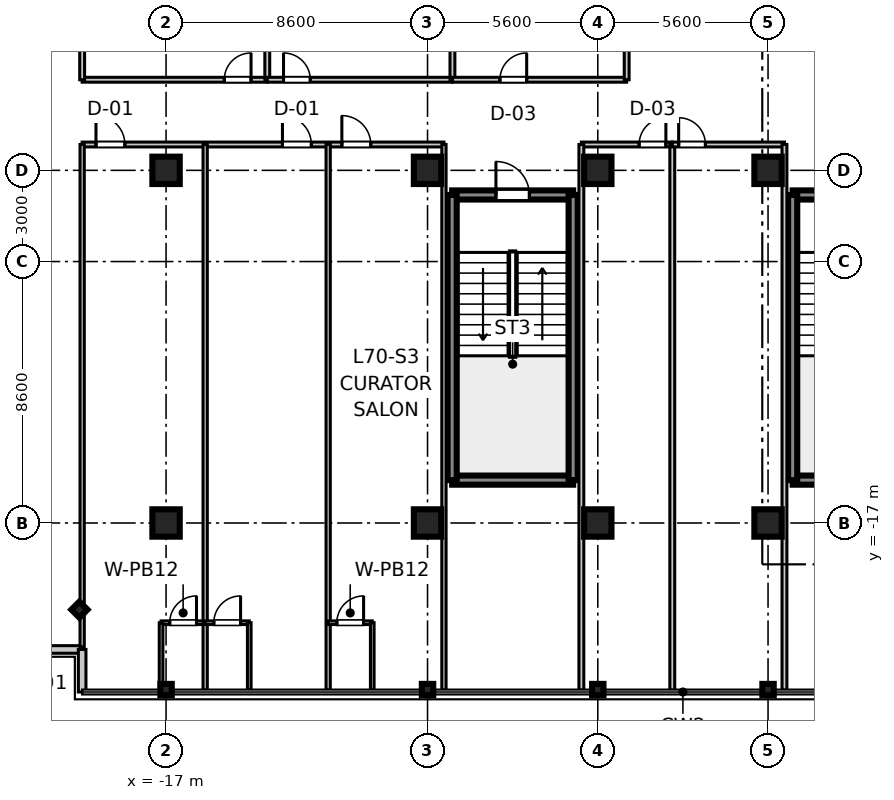
"""IFC4 building model, lengths in metres.
Left out: names, types, materials, properties, quantities, classifications, styles, units other than length and angle.
Written with IfcOpenShell. Run it as: python <this file> out.ifc"""

import sys

from ifc_helpers import new_model, si_unit, direction, frame, frame_2d, origin, origin_2d, place, context, subcontext, project, spatial, rectangle, i_section, extrude, source, transform, mapped, element, fill, save


model = new_model("IFC4")
c1 = context("Model", 3, precision=1e-05, world=origin(), true_north=direction((0.0, 1.0)))
c2 = subcontext(c1, "Body", "Model", "MODEL_VIEW")
j1 = project(units=[si_unit("LENGTHUNIT", "METRE"), si_unit("PLANEANGLEUNIT", "RADIAN")], contexts=[c1])
p1 = place(None, origin())
s1 = spatial("IfcSite", under=j1, at=p1, CompositionType="ELEMENT")
p2 = place(p1, origin())
s2 = spatial("IfcBuilding", under=s1, at=p2, CompositionType="ELEMENT")
p3 = place(p2, frame((0.0, 0.0, 273.8)))
s3 = spatial("IfcBuildingStorey", under=s2, at=p3, CompositionType="ELEMENT", Elevation=273.8)
m1 = source(origin(), c2, "Body", "SweptSolid", [
    extrude(rectangle(XDim=0.9, YDim=0.9, at=origin_2d()), origin(), (0.0, 0.0, 1.0), 3.705),
])
for number, where, z_axis, x_axis in (
    (1, (-17.0, -17.0, 0.0), (0.0, 0.0, 1.0), (1.0, 0.0, 0.0)),
    (2, (-17.0, -5.4, 0.0), (0.0, 0.0, 1.0), (1.0, 0.0, 0.0)),
    (3, (-8.4, -17.0, 0.0), (0.0, 0.0, 1.0), (1.0, 0.0, 0.0)),
    (4, (-8.4, -5.4, 0.0), (0.0, 0.0, 1.0), (1.0, 0.0, 0.0)),
    (5, (-2.8, -17.0, 0.0), (0.0, 0.0, 1.0), (1.0, 0.0, 0.0)),
    (6, (-2.8, -5.4, 0.0), (0.0, 0.0, 1.0), (1.0, 0.0, 0.0)),
    (7, (2.8, -17.0, 0.0), (0.0, 0.0, 1.0), (1.0, 0.0, 0.0)),
    (8, (2.8, -5.4, 0.0), (0.0, 0.0, 1.0), (1.0, 0.0, 0.0)),
):
    element("IfcColumn", number, at=place(p3, frame(where, z_axis=z_axis, x_axis=x_axis)), inside=s3, PredefinedType="COLUMN", context=c2, shape_type="MappedRepresentation", body=[
        mapped(m1, transform((0.0, 0.0, 0.0), scale=1.0)),
    ])
m2 = source(origin(), c2, "Body", "SweptSolid", [
    extrude(i_section(OverallWidth=0.374, OverallDepth=0.374, WebThickness=0.014, FlangeThickness=0.023, at=origin_2d()), origin(), (0.0, 0.0, 1.0), 3.705),
])
for number, where, z_axis, x_axis in (
    (9, (-17.0, -22.48, 0.0), (0.0, 0.0, 1.0), (0.0, 1.0, 0.0)),
    (10, (-8.4, -22.48, 0.0), (0.0, 0.0, 1.0), (0.0, 1.0, 0.0)),
    (11, (-2.8, -22.48, 0.0), (0.0, 0.0, 1.0), (0.0, 1.0, 0.0)),
    (12, (2.8, -22.48, 0.0), (0.0, 0.0, 1.0), (0.0, 1.0, 0.0)),
    (13, (-19.85, -19.85, 0.0), (0.0, 0.0, 1.0), (0.707, 0.707, 0.0)),
):
    element("IfcColumn", number, at=place(p3, frame(where, z_axis=z_axis, x_axis=x_axis)), inside=s3, PredefinedType="COLUMN", context=c2, shape_type="MappedRepresentation", body=[
        mapped(m2, transform((0.0, 0.0, 0.0), scale=1.0)),
    ])
m3 = source(origin(), c2, "Body", "SweptSolid", [
    extrude(rectangle(XDim=3.98, YDim=0.3, at=frame_2d((1.99, 0.0))), origin(), (0.0, 0.0, 1.0), 3.45),
])
for number, where, z_axis, x_axis in (
    (14, (3.61, -15.59, 0.0), (0.0, 0.0, 1.0), (1.0, 0.0, 0.0)),
    (15, (3.61, -6.21, 0.0), (0.0, 0.0, 1.0), (1.0, 0.0, 0.0)),
):
    element("IfcWall", number, at=place(p3, frame(where, z_axis=z_axis, x_axis=x_axis)), inside=s3, PredefinedType="SHEAR", context=c2, shape_type="MappedRepresentation", body=[
        mapped(m3, transform((0.0, 0.0, 0.0), scale=1.0)),
    ])
m4 = source(origin(), c2, "Body", "SweptSolid", [
    extrude(rectangle(XDim=9.38, YDim=0.3, at=frame_2d((4.69, 0.0))), origin(), (0.0, 0.0, 1.0), 3.45),
])
p4 = place(p3, frame((3.61, -15.59, 0.0), z_axis=(0.0, 0.0, 1.0), x_axis=(0.0, 1.0, 0.0)))
e16 = element("IfcWall", 16, at=p4, inside=s3, PredefinedType="SHEAR", context=c2, shape_type="MappedRepresentation", body=[
    mapped(m4, transform((0.0, 0.0, 0.0), scale=1.0)),
])
p5 = place(p3, frame((-7.59, -15.59, 0.0), z_axis=(0.0, 0.0, 1.0), x_axis=(1.0, 0.0, 0.0)))
e17 = element("IfcWall", 17, at=p5, inside=s3, PredefinedType="SHEAR", context=c2, shape_type="MappedRepresentation", body=[
    mapped(m3, transform((0.0, 0.0, 0.0), scale=1.0)),
])
p6 = place(p3, frame((-7.59, -6.21, 0.0), z_axis=(0.0, 0.0, 1.0), x_axis=(1.0, 0.0, 0.0)))
e18 = element("IfcWall", 18, at=p6, inside=s3, PredefinedType="SHEAR", context=c2, shape_type="MappedRepresentation", body=[
    mapped(m3, transform((0.0, 0.0, 0.0), scale=1.0)),
])
p7 = place(p6, frame((1.44, 0.0, 0.0)))
e19 = element("IfcOpeningElement", 19, at=p7, cuts=e18, PredefinedType="OPENING", context=c2, shape_type="SweptSolid", body=[
    extrude(rectangle(XDim=1.1, YDim=2.15, at=frame_2d((0.55, 1.075))), frame((0.0, 0.16, 0.0), z_axis=(0.0, -1.0, 0.0), x_axis=(1.0, 0.0, 0.0)), (0.0, 0.0, 1.0), 0.32),
])
for number, where, z_axis, x_axis in (
    (20, (-7.59, -15.59, 0.0), (0.0, 0.0, 1.0), (0.0, 1.0, 0.0)),
    (21, (-3.61, -15.59, 0.0), (0.0, 0.0, 1.0), (0.0, 1.0, 0.0)),
):
    element("IfcWall", number, at=place(p3, frame(where, z_axis=z_axis, x_axis=x_axis)), inside=s3, PredefinedType="SHEAR", context=c2, shape_type="MappedRepresentation", body=[
        mapped(m4, transform((0.0, 0.0, 0.0), scale=1.0)),
    ])
m5 = source(origin(), c2, "Body", "SweptSolid", [
    extrude(rectangle(XDim=1.4, YDim=0.25, at=frame_2d((0.7, 0.0))), origin(), (0.0, 0.0, 1.0), 3.45),
])
p8 = place(p3, frame((-21.16, -21.16, 0.0), z_axis=(0.0, 0.0, 1.0), x_axis=(1.0, 0.0, 0.0)))
e22 = element("IfcWall", 22, at=p8, inside=s3, PredefinedType="STANDARD", context=c2, shape_type="MappedRepresentation", body=[
    mapped(m5, transform((0.0, 0.0, 0.0), scale=1.0)),
])
m6 = source(origin(), c2, "Body", "SweptSolid", [
    extrude(rectangle(XDim=1.4, YDim=0.25, at=frame_2d((0.7, 0.0))), origin(), (0.0, 0.0, 1.0), 3.45),
])
p9 = place(p3, frame((-19.76, -22.56, 0.0), z_axis=(0.0, 0.0, 1.0), x_axis=(0.0, 1.0, 0.0)))
e23 = element("IfcWall", 23, at=p9, inside=s3, PredefinedType="STANDARD", context=c2, shape_type="MappedRepresentation", body=[
    mapped(m6, transform((0.0, 0.0, 0.0), scale=1.0)),
])
m7 = source(origin(), c2, "Body", "SweptSolid", [
    extrude(rectangle(XDim=11.9, YDim=0.16, at=frame_2d((5.95, 0.0))), origin(), (0.0, 0.0, 1.0), 2.79),
])
p10 = place(p3, frame((-19.76, -4.55, 0.0), z_axis=(0.0, 0.0, 1.0), x_axis=(1.0, 0.0, 0.0)))
e24 = element("IfcWall", 24, at=p10, inside=s3, PredefinedType="PARTITIONING", context=c2, shape_type="MappedRepresentation", body=[
    mapped(m7, transform((0.0, 0.0, 0.0), scale=1.0)),
])
p11 = place(p10, frame((0.455, 0.0, 0.0)))
e25 = element("IfcOpeningElement", 25, at=p11, cuts=e24, PredefinedType="OPENING", context=c2, shape_type="SweptSolid", body=[
    extrude(rectangle(XDim=0.95, YDim=2.1, at=frame_2d((0.475, 1.05))), frame((0.0, 0.09, 0.0), z_axis=(0.0, -1.0, 0.0), x_axis=(1.0, 0.0, 0.0)), (0.0, 0.0, 1.0), 0.18),
])
p12 = place(p10, frame((6.588, 0.0, 0.0)))
e26 = element("IfcOpeningElement", 26, at=p12, cuts=e24, PredefinedType="OPENING", context=c2, shape_type="SweptSolid", body=[
    extrude(rectangle(XDim=0.95, YDim=2.1, at=frame_2d((0.475, 1.05))), frame((0.0, 0.09, 0.0), z_axis=(0.0, -1.0, 0.0), x_axis=(1.0, 0.0, 0.0)), (0.0, 0.0, 1.0), 0.18),
])
p13 = place(p10, frame((8.542, 0.0, 0.0)))
e27 = element("IfcOpeningElement", 27, at=p13, cuts=e24, PredefinedType="OPENING", context=c2, shape_type="SweptSolid", body=[
    extrude(rectangle(XDim=0.95, YDim=2.1, at=frame_2d((0.475, 1.05))), frame((0.0, 0.09, 0.0), z_axis=(0.0, -1.0, 0.0), x_axis=(1.0, 0.0, 0.0)), (0.0, 0.0, 1.0), 0.18),
])
m8 = source(origin(), c2, "Body", "SweptSolid", [
    extrude(rectangle(XDim=16.53, YDim=0.14, at=frame_2d((8.265, 0.0))), origin(), (0.0, 0.0, 1.0), 2.79),
])
p14 = place(p3, frame((-19.76, -21.08, 0.0), z_axis=(0.0, 0.0, 1.0), x_axis=(0.0, 1.0, 0.0)))
e28 = element("IfcWall", 28, at=p14, inside=s3, PredefinedType="PARTITIONING", context=c2, shape_type="MappedRepresentation", body=[
    mapped(m8, transform((0.0, 0.0, 0.0), scale=1.0)),
])
m9 = source(origin(), c2, "Body", "SweptSolid", [
    extrude(rectangle(XDim=17.95, YDim=0.14, at=frame_2d((8.975, 0.0))), origin(), (0.0, 0.0, 1.0), 2.79),
])
p15 = place(p3, frame((-7.86, -22.5, 0.0), z_axis=(0.0, 0.0, 1.0), x_axis=(0.0, 1.0, 0.0)))
e29 = element("IfcWall", 29, at=p15, inside=s3, PredefinedType="PARTITIONING", context=c2, shape_type="MappedRepresentation", body=[
    mapped(m9, transform((0.0, 0.0, 0.0), scale=1.0)),
])
m10 = source(origin(), c2, "Body", "SweptSolid", [
    extrude(rectangle(XDim=1.45, YDim=0.12, at=frame_2d((0.725, 0.0))), origin(), (0.0, 0.0, 1.0), 2.79),
])
p16 = place(p3, frame((-17.164, -20.28, 0.0), z_axis=(0.0, 0.0, 1.0), x_axis=(1.0, 0.0, 0.0)))
e30 = element("IfcWall", 30, at=p16, inside=s3, PredefinedType="PARTITIONING", context=c2, shape_type="MappedRepresentation", body=[
    mapped(m10, transform((0.0, 0.0, 0.0), scale=1.0)),
])
p17 = place(p16, frame((0.285, 0.0, 0.0)))
e31 = element("IfcOpeningElement", 31, at=p17, cuts=e30, PredefinedType="OPENING", context=c2, shape_type="SweptSolid", body=[
    extrude(rectangle(XDim=0.88, YDim=2.1, at=frame_2d((0.44, 1.05))), frame((0.0, 0.07, 0.0), z_axis=(0.0, -1.0, 0.0), x_axis=(1.0, 0.0, 0.0)), (0.0, 0.0, 1.0), 0.14),
])
m11 = source(origin(), c2, "Body", "SweptSolid", [
    extrude(rectangle(XDim=2.22, YDim=0.12, at=frame_2d((1.11, 0.0))), origin(), (0.0, 0.0, 1.0), 2.79),
])
p18 = place(p3, frame((-17.164, -22.5, 0.0), z_axis=(0.0, 0.0, 1.0), x_axis=(0.0, 1.0, 0.0)))
e32 = element("IfcWall", 32, at=p18, inside=s3, PredefinedType="PARTITIONING", context=c2, shape_type="MappedRepresentation", body=[
    mapped(m11, transform((0.0, 0.0, 0.0), scale=1.0)),
])
p19 = place(p3, frame((-15.714, -22.5, 0.0), z_axis=(0.0, 0.0, 1.0), x_axis=(0.0, 1.0, 0.0)))
e33 = element("IfcWall", 33, at=p19, inside=s3, PredefinedType="PARTITIONING", context=c2, shape_type="MappedRepresentation", body=[
    mapped(m9, transform((0.0, 0.0, 0.0), scale=1.0)),
])
m12 = source(origin(), c2, "Body", "SweptSolid", [
    extrude(rectangle(XDim=1.45, YDim=0.12, at=frame_2d((0.725, 0.0))), origin(), (0.0, 0.0, 1.0), 2.79),
])
p20 = place(p3, frame((-15.714, -20.28, 0.0), z_axis=(0.0, 0.0, 1.0), x_axis=(1.0, 0.0, 0.0)))
e34 = element("IfcWall", 34, at=p20, inside=s3, PredefinedType="PARTITIONING", context=c2, shape_type="MappedRepresentation", body=[
    mapped(m12, transform((0.0, 0.0, 0.0), scale=1.0)),
])
p21 = place(p20, frame((0.285, 0.0, 0.0)))
e35 = element("IfcOpeningElement", 35, at=p21, cuts=e34, PredefinedType="OPENING", context=c2, shape_type="SweptSolid", body=[
    extrude(rectangle(XDim=0.88, YDim=2.1, at=frame_2d((0.44, 1.05))), frame((0.0, 0.07, 0.0), z_axis=(0.0, -1.0, 0.0), x_axis=(1.0, 0.0, 0.0)), (0.0, 0.0, 1.0), 0.14),
])
p22 = place(p3, frame((-14.264, -22.5, 0.0), z_axis=(0.0, 0.0, 1.0), x_axis=(0.0, 1.0, 0.0)))
e36 = element("IfcWall", 36, at=p22, inside=s3, PredefinedType="PARTITIONING", context=c2, shape_type="MappedRepresentation", body=[
    mapped(m11, transform((0.0, 0.0, 0.0), scale=1.0)),
])
p23 = place(p3, frame((-11.668, -22.5, 0.0), z_axis=(0.0, 0.0, 1.0), x_axis=(0.0, 1.0, 0.0)))
e37 = element("IfcWall", 37, at=p23, inside=s3, PredefinedType="PARTITIONING", context=c2, shape_type="MappedRepresentation", body=[
    mapped(m9, transform((0.0, 0.0, 0.0), scale=1.0)),
])
p24 = place(p3, frame((-11.668, -20.28, 0.0), z_axis=(0.0, 0.0, 1.0), x_axis=(1.0, 0.0, 0.0)))
e38 = element("IfcWall", 38, at=p24, inside=s3, PredefinedType="PARTITIONING", context=c2, shape_type="MappedRepresentation", body=[
    mapped(m10, transform((0.0, 0.0, 0.0), scale=1.0)),
])
p25 = place(p24, frame((0.285, 0.0, 0.0)))
e39 = element("IfcOpeningElement", 39, at=p25, cuts=e38, PredefinedType="OPENING", context=c2, shape_type="SweptSolid", body=[
    extrude(rectangle(XDim=0.88, YDim=2.1, at=frame_2d((0.44, 1.05))), frame((0.0, 0.07, 0.0), z_axis=(0.0, -1.0, 0.0), x_axis=(1.0, 0.0, 0.0)), (0.0, 0.0, 1.0), 0.14),
])
p26 = place(p3, frame((-10.218, -22.5, 0.0), z_axis=(0.0, 0.0, 1.0), x_axis=(0.0, 1.0, 0.0)))
e40 = element("IfcWall", 40, at=p26, inside=s3, PredefinedType="PARTITIONING", context=c2, shape_type="MappedRepresentation", body=[
    mapped(m11, transform((0.0, 0.0, 0.0), scale=1.0)),
])
m13 = source(origin(), c2, "Body", "SweptSolid", [
    extrude(rectangle(XDim=2.99, YDim=0.16, at=frame_2d((1.495, 0.0))), origin(), (0.0, 0.0, 1.0), 2.79),
])
p27 = place(p3, frame((-3.34, -4.55, 0.0), z_axis=(0.0, 0.0, 1.0), x_axis=(1.0, 0.0, 0.0)))
e41 = element("IfcWall", 41, at=p27, inside=s3, PredefinedType="PARTITIONING", context=c2, shape_type="MappedRepresentation", body=[
    mapped(m13, transform((0.0, 0.0, 0.0), scale=1.0)),
])
p28 = place(p27, frame((1.9, 0.0, 0.0)))
e42 = element("IfcOpeningElement", 42, at=p28, cuts=e41, PredefinedType="OPENING", context=c2, shape_type="SweptSolid", body=[
    extrude(rectangle(XDim=0.88, YDim=2.1, at=frame_2d((0.44, 1.05))), frame((0.0, 0.09, 0.0), z_axis=(0.0, -1.0, 0.0), x_axis=(1.0, 0.0, 0.0)), (0.0, 0.0, 1.0), 0.18),
])
m14 = source(origin(), c2, "Body", "SweptSolid", [
    extrude(rectangle(XDim=17.95, YDim=0.16, at=frame_2d((8.975, 0.0))), origin(), (0.0, 0.0, 1.0), 2.79),
])
for number, where, z_axis, x_axis in (
    (43, (-3.34, -22.5, 0.0), (0.0, 0.0, 1.0), (0.0, 1.0, 0.0)),
    (44, (-0.35, -22.5, 0.0), (0.0, 0.0, 1.0), (0.0, 1.0, 0.0)),
):
    element("IfcWall", number, at=place(p3, frame(where, z_axis=z_axis, x_axis=x_axis)), inside=s3, PredefinedType="PARTITIONING", context=c2, shape_type="MappedRepresentation", body=[
        mapped(m14, transform((0.0, 0.0, 0.0), scale=1.0)),
    ])
m15 = source(origin(), c2, "Body", "SweptSolid", [
    extrude(rectangle(XDim=3.69, YDim=0.16, at=frame_2d((1.845, 0.0))), origin(), (0.0, 0.0, 1.0), 2.79),
])
p29 = place(p3, frame((-0.35, -4.55, 0.0), z_axis=(0.0, 0.0, 1.0), x_axis=(1.0, 0.0, 0.0)))
e45 = element("IfcWall", 45, at=p29, inside=s3, PredefinedType="PARTITIONING", context=c2, shape_type="MappedRepresentation", body=[
    mapped(m15, transform((0.0, 0.0, 0.0), scale=1.0)),
])
p30 = place(p29, frame((0.21, 0.0, 0.0)))
e46 = element("IfcOpeningElement", 46, at=p30, cuts=e45, PredefinedType="OPENING", context=c2, shape_type="SweptSolid", body=[
    extrude(rectangle(XDim=0.88, YDim=2.1, at=frame_2d((0.44, 1.05))), frame((0.0, 0.09, 0.0), z_axis=(0.0, -1.0, 0.0), x_axis=(1.0, 0.0, 0.0)), (0.0, 0.0, 1.0), 0.18),
])
p31 = place(p3, frame((3.34, -22.5, 0.0), z_axis=(0.0, 0.0, 1.0), x_axis=(0.0, 1.0, 0.0)))
e47 = element("IfcWall", 47, at=p31, inside=s3, PredefinedType="PARTITIONING", context=c2, shape_type="MappedRepresentation", body=[
    mapped(m14, transform((0.0, 0.0, 0.0), scale=1.0)),
])
m16 = source(origin(), c2, "Body", "SweptSolid", [
    extrude(rectangle(XDim=6.089, YDim=0.16, at=frame_2d((3.044, 0.0))), origin(), (0.0, 0.0, 1.0), 2.79),
])
p32 = place(p3, frame((-19.76, -2.42, 0.0), z_axis=(0.0, 0.0, 1.0), x_axis=(1.0, 0.0, 0.0)))
e48 = element("IfcWall", 48, at=p32, inside=s3, PredefinedType="PARTITIONING", context=c2, shape_type="MappedRepresentation", body=[
    mapped(m16, transform((0.0, 0.0, 0.0), scale=1.0)),
])
p33 = place(p32, frame((4.675, 0.0, 0.0)))
e49 = element("IfcOpeningElement", 49, at=p33, cuts=e48, PredefinedType="OPENING", context=c2, shape_type="SweptSolid", body=[
    extrude(rectangle(XDim=0.88, YDim=2.1, at=frame_2d((0.44, 1.05))), frame((0.0, 0.09, 0.0), z_axis=(0.0, -1.0, 0.0), x_axis=(1.0, 0.0, 0.0)), (0.0, 0.0, 1.0), 0.18),
])
m17 = source(origin(), c2, "Body", "SweptSolid", [
    extrude(rectangle(XDim=6.89, YDim=0.16, at=frame_2d((3.445, 0.0))), origin(), (0.0, 0.0, 1.0), 2.79),
])
for number, where, z_axis, x_axis in (
    (50, (-19.76, -2.42, 0.0), (0.0, 0.0, 1.0), (0.0, 1.0, 0.0)),
    (51, (-13.671, -2.42, 0.0), (0.0, 0.0, 1.0), (0.0, 1.0, 0.0)),
):
    element("IfcWall", number, at=place(p3, frame(where, z_axis=z_axis, x_axis=x_axis)), inside=s3, PredefinedType="PARTITIONING", context=c2, shape_type="MappedRepresentation", body=[
        mapped(m17, transform((0.0, 0.0, 0.0), scale=1.0)),
    ])
m18 = source(origin(), c2, "Body", "SweptSolid", [
    extrude(rectangle(XDim=6.09, YDim=0.16, at=frame_2d((3.045, 0.0))), origin(), (0.0, 0.0, 1.0), 2.79),
])
p34 = place(p3, frame((-13.671, -2.42, 0.0), z_axis=(0.0, 0.0, 1.0), x_axis=(1.0, 0.0, 0.0)))
e52 = element("IfcWall", 52, at=p34, inside=s3, PredefinedType="PARTITIONING", context=c2, shape_type="MappedRepresentation", body=[
    mapped(m18, transform((0.0, 0.0, 0.0), scale=1.0)),
])
p35 = place(p34, frame((0.534, 0.0, 0.0)))
e53 = element("IfcOpeningElement", 53, at=p35, cuts=e52, PredefinedType="OPENING", context=c2, shape_type="SweptSolid", body=[
    extrude(rectangle(XDim=0.88, YDim=2.1, at=frame_2d((0.44, 1.05))), frame((0.0, 0.09, 0.0), z_axis=(0.0, -1.0, 0.0), x_axis=(1.0, 0.0, 0.0)), (0.0, 0.0, 1.0), 0.18),
])
p36 = place(p3, frame((-7.581, -2.42, 0.0), z_axis=(0.0, 0.0, 1.0), x_axis=(0.0, 1.0, 0.0)))
e54 = element("IfcWall", 54, at=p36, inside=s3, PredefinedType="PARTITIONING", context=c2, shape_type="MappedRepresentation", body=[
    mapped(m17, transform((0.0, 0.0, 0.0), scale=1.0)),
])
m19 = source(origin(), c2, "Body", "SweptSolid", [
    extrude(rectangle(XDim=5.731, YDim=0.16, at=frame_2d((2.865, 0.0))), origin(), (0.0, 0.0, 1.0), 2.79),
])
p37 = place(p3, frame((-7.581, -2.42, 0.0), z_axis=(0.0, 0.0, 1.0), x_axis=(1.0, 0.0, 0.0)))
e55 = element("IfcWall", 55, at=p37, inside=s3, PredefinedType="PARTITIONING", context=c2, shape_type="MappedRepresentation", body=[
    mapped(m19, transform((0.0, 0.0, 0.0), scale=1.0)),
])
p38 = place(p37, frame((1.562, 0.0, 0.0)))
e56 = element("IfcOpeningElement", 56, at=p38, cuts=e55, PredefinedType="OPENING", context=c2, shape_type="SweptSolid", body=[
    extrude(rectangle(XDim=0.88, YDim=2.1, at=frame_2d((0.44, 1.05))), frame((0.0, 0.09, 0.0), z_axis=(0.0, -1.0, 0.0), x_axis=(1.0, 0.0, 0.0)), (0.0, 0.0, 1.0), 0.18),
])
m20 = source(origin(), c2, "Body", "SweptSolid", [
    extrude(rectangle(XDim=3.42, YDim=0.16, at=frame_2d((1.71, 0.0))), origin(), (0.0, 0.0, 1.0), 2.79),
])
p39 = place(p3, frame((-1.85, -2.42, 0.0), z_axis=(0.0, 0.0, 1.0), x_axis=(0.0, 1.0, 0.0)))
e57 = element("IfcWall", 57, at=p39, inside=s3, PredefinedType="PARTITIONING", context=c2, shape_type="MappedRepresentation", body=[
    mapped(m20, transform((0.0, 0.0, 0.0), scale=1.0)),
])
m21 = source(origin(), c2, "Body", "SweptSolid", [
    extrude(rectangle(XDim=1.1, YDim=2.15, at=frame_2d((0.55, 1.075))), frame((0.0, 0.025, 0.0), z_axis=(0.0, -1.0, 0.0), x_axis=(1.0, 0.0, 0.0)), (0.0, 0.0, 1.0), 0.05),
])
p40 = place(p7, frame((1.1, 0.0, 0.0), z_axis=(0.0, 0.0, 1.0), x_axis=(-1.0, 0.0, 0.0)))
e58 = element("IfcDoor", 58, at=p40, inside=s3, OperationType="SINGLE_SWING_LEFT", PredefinedType="DOOR", context=c2, shape_type="MappedRepresentation", body=[
    mapped(m21, transform((0.0, 0.0, 0.0), scale=1.0)),
])
fill(e19, e58)
m22 = source(origin(), c2, "Body", "SweptSolid", [
    extrude(rectangle(XDim=0.88, YDim=2.1, at=frame_2d((0.44, 1.05))), frame((0.0, 0.025, 0.0), z_axis=(0.0, -1.0, 0.0), x_axis=(1.0, 0.0, 0.0)), (0.0, 0.0, 1.0), 0.05),
])
p41 = place(p17, frame((0.88, 0.0, 0.0), z_axis=(0.0, 0.0, 1.0), x_axis=(-1.0, 0.0, 0.0)))
e59 = element("IfcDoor", 59, at=p41, inside=s3, OperationType="SINGLE_SWING_RIGHT", PredefinedType="DOOR", context=c2, shape_type="MappedRepresentation", body=[
    mapped(m22, transform((0.0, 0.0, 0.0), scale=1.0)),
])
fill(e31, e59)
m23 = source(origin(), c2, "Body", "SweptSolid", [
    extrude(rectangle(XDim=0.95, YDim=2.1, at=frame_2d((0.475, 1.05))), frame((0.0, 0.025, 0.0), z_axis=(0.0, -1.0, 0.0), x_axis=(1.0, 0.0, 0.0)), (0.0, 0.0, 1.0), 0.05),
])
p42 = place(p11, frame((0.95, 0.0, 0.0), z_axis=(0.0, 0.0, 1.0), x_axis=(-1.0, 0.0, 0.0)))
e60 = element("IfcDoor", 60, at=p42, inside=s3, OperationType="SINGLE_SWING_LEFT", PredefinedType="DOOR", context=c2, shape_type="MappedRepresentation", body=[
    mapped(m23, transform((0.0, 0.0, 0.0), scale=1.0)),
])
fill(e25, e60)
p43 = place(p21, frame((0.88, 0.0, 0.0), z_axis=(0.0, 0.0, 1.0), x_axis=(-1.0, 0.0, 0.0)))
e61 = element("IfcDoor", 61, at=p43, inside=s3, OperationType="SINGLE_SWING_RIGHT", PredefinedType="DOOR", context=c2, shape_type="MappedRepresentation", body=[
    mapped(m22, transform((0.0, 0.0, 0.0), scale=1.0)),
])
fill(e35, e61)
p44 = place(p12, frame((0.95, 0.0, 0.0), z_axis=(0.0, 0.0, 1.0), x_axis=(-1.0, 0.0, 0.0)))
e62 = element("IfcDoor", 62, at=p44, inside=s3, OperationType="SINGLE_SWING_LEFT", PredefinedType="DOOR", context=c2, shape_type="MappedRepresentation", body=[
    mapped(m23, transform((0.0, 0.0, 0.0), scale=1.0)),
])
fill(e26, e62)
p45 = place(p25, frame((0.88, 0.0, 0.0), z_axis=(0.0, 0.0, 1.0), x_axis=(-1.0, 0.0, 0.0)))
e63 = element("IfcDoor", 63, at=p45, inside=s3, OperationType="SINGLE_SWING_RIGHT", PredefinedType="DOOR", context=c2, shape_type="MappedRepresentation", body=[
    mapped(m22, transform((0.0, 0.0, 0.0), scale=1.0)),
])
fill(e39, e63)
p46 = place(p13, frame((0.95, 0.0, 0.0), z_axis=(0.0, 0.0, 1.0), x_axis=(-1.0, 0.0, 0.0)))
e64 = element("IfcDoor", 64, at=p46, inside=s3, OperationType="SINGLE_SWING_LEFT", PredefinedType="DOOR", context=c2, shape_type="MappedRepresentation", body=[
    mapped(m23, transform((0.0, 0.0, 0.0), scale=1.0)),
])
fill(e27, e64)
p47 = place(p28, frame((0.88, 0.0, 0.0), z_axis=(0.0, 0.0, 1.0), x_axis=(-1.0, 0.0, 0.0)))
e65 = element("IfcDoor", 65, at=p47, inside=s3, OperationType="SINGLE_SWING_RIGHT", PredefinedType="DOOR", context=c2, shape_type="MappedRepresentation", body=[
    mapped(m22, transform((0.0, 0.0, 0.0), scale=1.0)),
])
fill(e42, e65)
p48 = place(p30, frame((0.88, 0.0, 0.0), z_axis=(0.0, 0.0, 1.0), x_axis=(-1.0, 0.0, 0.0)))
e66 = element("IfcDoor", 66, at=p48, inside=s3, OperationType="SINGLE_SWING_LEFT", PredefinedType="DOOR", context=c2, shape_type="MappedRepresentation", body=[
    mapped(m22, transform((0.0, 0.0, 0.0), scale=1.0)),
])
fill(e46, e66)
p49 = place(p33, origin())
e67 = element("IfcDoor", 67, at=p49, inside=s3, OperationType="SINGLE_SWING_RIGHT", PredefinedType="DOOR", context=c2, shape_type="MappedRepresentation", body=[
    mapped(m22, transform((0.0, 0.0, 0.0), scale=1.0)),
])
fill(e49, e67)
p50 = place(p35, origin())
e68 = element("IfcDoor", 68, at=p50, inside=s3, OperationType="SINGLE_SWING_LEFT", PredefinedType="DOOR", context=c2, shape_type="MappedRepresentation", body=[
    mapped(m22, transform((0.0, 0.0, 0.0), scale=1.0)),
])
fill(e53, e68)
p51 = place(p38, origin())
e69 = element("IfcDoor", 69, at=p51, inside=s3, OperationType="SINGLE_SWING_RIGHT", PredefinedType="DOOR", context=c2, shape_type="MappedRepresentation", body=[
    mapped(m22, transform((0.0, 0.0, 0.0), scale=1.0)),
])
fill(e56, e69)
save(model, sys.argv[1])
